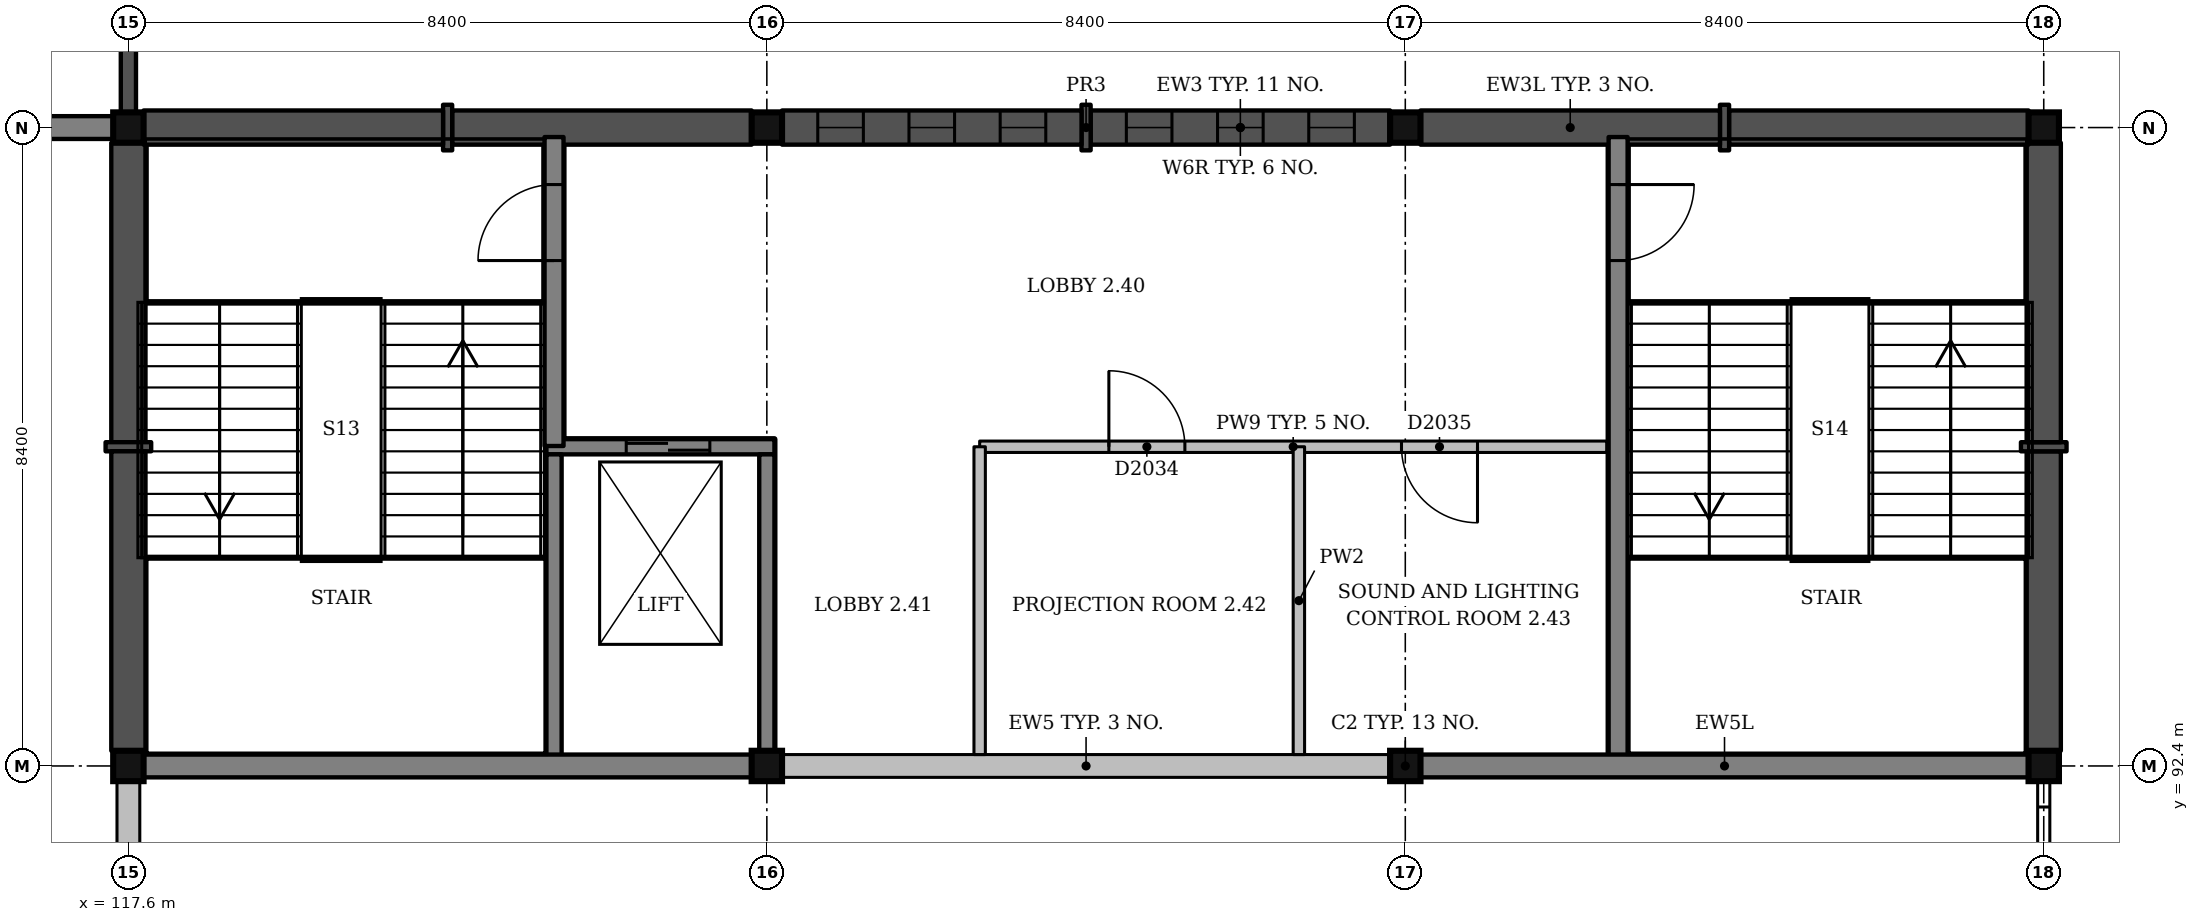
"""IFC4 building model, lengths in metres.
Left out: names, types, materials, properties, quantities, classifications, styles, units other than length and angle.
Written with IfcOpenShell. Run it as: python <this file> out.ifc"""

import sys

from ifc_helpers import new_model, si_unit, direction, frame, frame_2d, origin, origin_2d, place, context, subcontext, project, spatial, rectangle, extrude, element, fill, save


model = new_model("IFC4")
c1 = context("Model", 3, precision=1e-05, world=origin(), true_north=direction((0.0, 1.0)))
c2 = subcontext(c1, "Body", "Model", "MODEL_VIEW")
j1 = project(units=[si_unit("LENGTHUNIT", "METRE"), si_unit("PLANEANGLEUNIT", "RADIAN")], contexts=[c1])
p1 = place(None, origin())
s1 = spatial("IfcSite", under=j1, at=p1, CompositionType="ELEMENT")
p2 = place(p1, origin())
s2 = spatial("IfcBuilding", under=s1, at=p2, CompositionType="ELEMENT")
p3 = place(p2, frame((0.0, 0.0, 9.0)))
s3 = spatial("IfcBuildingStorey", under=s2, at=p3, CompositionType="ELEMENT", Elevation=9.0)
for number, where, z_axis, x_axis in (
    (1, (117.6, 92.4, 0.0), (0.0, 0.0, 1.0), (1.0, 0.0, 0.0)),
    (2, (117.6, 100.8, 0.0), (0.0, 0.0, 1.0), (1.0, 0.0, 0.0)),
    (3, (126.0, 92.4, 0.0), (0.0, 0.0, 1.0), (1.0, 0.0, 0.0)),
    (4, (126.0, 100.8, 0.0), (0.0, 0.0, 1.0), (1.0, 0.0, 0.0)),
    (5, (134.4, 92.4, 0.0), (0.0, 0.0, 1.0), (1.0, 0.0, 0.0)),
    (6, (134.4, 100.8, 0.0), (0.0, 0.0, 1.0), (1.0, 0.0, 0.0)),
    (7, (142.8, 92.4, 0.0), (0.0, 0.0, 1.0), (1.0, 0.0, 0.0)),
    (8, (142.8, 100.8, 0.0), (0.0, 0.0, 1.0), (1.0, 0.0, 0.0)),
):
    element("IfcColumn", number, at=place(p3, frame(where, z_axis=z_axis, x_axis=x_axis)), inside=s3, PredefinedType="COLUMN", context=c2, shape_type="SweptSolid", body=[
        extrude(rectangle(XDim=0.4, YDim=0.4, at=origin_2d()), origin(), (0.0, 0.0, 1.0), 4.5),
    ])
p4 = place(p3, frame((123.1, 96.6, 0.0), z_axis=(0.0, 0.0, 1.0), x_axis=(1.0, 0.0, 0.0)))
e9 = element("IfcWall", 9, at=p4, inside=s3, PredefinedType="SHEAR", context=c2, shape_type="SweptSolid", body=[
    extrude(rectangle(XDim=3.0, YDim=0.2, at=frame_2d((1.5, 0.0))), origin(), (0.0, 0.0, 1.0), 4.5),
])
p5 = place(p4, frame((1.05, 0.0, 0.0)))
e10 = element("IfcOpeningElement", 10, at=p5, cuts=e9, PredefinedType="OPENING", context=c2, shape_type="SweptSolid", body=[
    extrude(rectangle(XDim=1.1, YDim=2.1, at=frame_2d((0.55, 1.05))), frame((0.0, 0.11, 0.0), z_axis=(0.0, -1.0, 0.0), x_axis=(1.0, 0.0, 0.0)), (0.0, 0.0, 1.0), 0.22),
])
p6 = place(p3, frame((123.2, 92.5, 0.0), z_axis=(0.0, 0.0, 1.0), x_axis=(0.0, 1.0, 0.0)))
e11 = element("IfcWall", 11, at=p6, inside=s3, PredefinedType="SHEAR", context=c2, shape_type="SweptSolid", body=[
    extrude(rectangle(XDim=4.0, YDim=0.2, at=frame_2d((2.0, 0.0))), origin(), (0.0, 0.0, 1.0), 4.5),
])
p7 = place(p3, frame((126.0, 92.6, 0.0), z_axis=(0.0, 0.0, 1.0), x_axis=(0.0, 1.0, 0.0)))
e12 = element("IfcWall", 12, at=p7, inside=s3, PredefinedType="SHEAR", context=c2, shape_type="SweptSolid", body=[
    extrude(rectangle(XDim=3.9, YDim=0.2, at=frame_2d((1.95, 0.0))), origin(), (0.0, 0.0, 1.0), 4.5),
])
p8 = place(p3, frame((123.2, 96.61, 0.0), z_axis=(0.0, 0.0, 1.0), x_axis=(0.0, 1.0, 0.0)))
e13 = element("IfcWall", 13, at=p8, inside=s3, PredefinedType="SHEAR", context=c2, shape_type="SweptSolid", body=[
    extrude(rectangle(XDim=4.065, YDim=0.25, at=frame_2d((2.032, 0.0))), origin(), (0.0, 0.0, 1.0), 4.5),
])
p9 = place(p8, frame((2.44, 0.0, 0.0)))
e14 = element("IfcOpeningElement", 14, at=p9, cuts=e13, PredefinedType="OPENING", context=c2, shape_type="SweptSolid", body=[
    extrude(rectangle(XDim=1.0, YDim=2.1, at=frame_2d((0.5, 1.05))), frame((0.0, 0.135, 0.0), z_axis=(0.0, -1.0, 0.0), x_axis=(1.0, 0.0, 0.0)), (0.0, 0.0, 1.0), 0.27),
])
p10 = place(p3, frame((137.2, 92.525, 0.0), z_axis=(0.0, 0.0, 1.0), x_axis=(0.0, 1.0, 0.0)))
e15 = element("IfcWall", 15, at=p10, inside=s3, PredefinedType="SHEAR", context=c2, shape_type="SweptSolid", body=[
    extrude(rectangle(XDim=8.15, YDim=0.25, at=frame_2d((4.075, 0.0))), origin(), (0.0, 0.0, 1.0), 4.5),
])
p11 = place(p10, frame((6.525, 0.0, 0.0)))
e16 = element("IfcOpeningElement", 16, at=p11, cuts=e15, PredefinedType="OPENING", context=c2, shape_type="SweptSolid", body=[
    extrude(rectangle(XDim=1.0, YDim=2.1, at=frame_2d((0.5, 1.05))), frame((0.0, 0.135, 0.0), z_axis=(0.0, -1.0, 0.0), x_axis=(1.0, 0.0, 0.0)), (0.0, 0.0, 1.0), 0.27),
])
p12 = place(p3, frame((117.6, 100.6, 0.0), z_axis=(0.0, 0.0, 1.0), x_axis=(0.0, -1.0, 0.0)))
e17 = element("IfcWall", 17, at=p12, inside=s3, PredefinedType="SOLIDWALL", context=c2, shape_type="SweptSolid", body=[
    extrude(rectangle(XDim=3.94, YDim=0.45, at=frame_2d((1.97, 0.0))), origin(), (0.0, 0.0, 1.0), 3.65),
])
p13 = place(p3, frame((117.6, 96.66, 0.0), z_axis=(0.0, 0.0, 1.0), x_axis=(0.0, -1.0, 0.0)))
e18 = element("IfcWall", 18, at=p13, inside=s3, PredefinedType="SOLIDWALL", context=c2, shape_type="SweptSolid", body=[
    extrude(rectangle(XDim=0.12, YDim=0.6, at=frame_2d((0.06, 0.0))), origin(), (0.0, 0.0, 1.0), 3.65),
])
p14 = place(p3, frame((117.6, 96.54, 0.0), z_axis=(0.0, 0.0, 1.0), x_axis=(0.0, -1.0, 0.0)))
e19 = element("IfcWall", 19, at=p14, inside=s3, PredefinedType="SOLIDWALL", context=c2, shape_type="SweptSolid", body=[
    extrude(rectangle(XDim=3.94, YDim=0.45, at=frame_2d((1.97, 0.0))), origin(), (0.0, 0.0, 1.0), 3.65),
])
p15 = place(p3, frame((117.8, 92.4, 0.0), z_axis=(0.0, 0.0, 1.0), x_axis=(1.0, 0.0, 0.0)))
e20 = element("IfcWall", 20, at=p15, inside=s3, PredefinedType="SOLIDWALL", context=c2, shape_type="SweptSolid", body=[
    extrude(rectangle(XDim=8.0, YDim=0.3, at=frame_2d((4.0, 0.0))), origin(), (0.0, 0.0, 1.0), 3.65),
])
for number, where, z_axis, x_axis in (
    (21, (126.2, 92.4, 0.0), (0.0, 0.0, 1.0), (1.0, 0.0, 0.0)),
    (22, (134.6, 92.4, 0.0), (0.0, 0.0, 1.0), (1.0, 0.0, 0.0)),
):
    element("IfcWall", number, at=place(p3, frame(where, z_axis=z_axis, x_axis=x_axis)), inside=s3, PredefinedType="SOLIDWALL", context=c2, shape_type="SweptSolid", body=[
        extrude(rectangle(XDim=8.0, YDim=0.3, at=frame_2d((4.0, 0.0))), origin(), (0.0, 0.0, 1.0), 3.35),
    ])
p16 = place(p3, frame((142.8, 92.6, 0.0), z_axis=(0.0, 0.0, 1.0), x_axis=(0.0, 1.0, 0.0)))
e23 = element("IfcWall", 23, at=p16, inside=s3, PredefinedType="SOLIDWALL", context=c2, shape_type="SweptSolid", body=[
    extrude(rectangle(XDim=3.94, YDim=0.45, at=frame_2d((1.97, 0.0))), origin(), (0.0, 0.0, 1.0), 3.65),
])
p17 = place(p3, frame((142.8, 96.54, 0.0), z_axis=(0.0, 0.0, 1.0), x_axis=(0.0, 1.0, 0.0)))
e24 = element("IfcWall", 24, at=p17, inside=s3, PredefinedType="SOLIDWALL", context=c2, shape_type="SweptSolid", body=[
    extrude(rectangle(XDim=0.12, YDim=0.6, at=frame_2d((0.06, 0.0))), origin(), (0.0, 0.0, 1.0), 3.65),
])
p18 = place(p3, frame((142.8, 96.66, 0.0), z_axis=(0.0, 0.0, 1.0), x_axis=(0.0, 1.0, 0.0)))
e25 = element("IfcWall", 25, at=p18, inside=s3, PredefinedType="SOLIDWALL", context=c2, shape_type="SweptSolid", body=[
    extrude(rectangle(XDim=3.94, YDim=0.45, at=frame_2d((1.97, 0.0))), origin(), (0.0, 0.0, 1.0), 3.65),
])
p19 = place(p3, frame((142.6, 100.8, 0.0), z_axis=(0.0, 0.0, 1.0), x_axis=(-1.0, 0.0, 0.0)))
e26 = element("IfcWall", 26, at=p19, inside=s3, PredefinedType="SOLIDWALL", context=c2, shape_type="SweptSolid", body=[
    extrude(rectangle(XDim=3.94, YDim=0.45, at=frame_2d((1.97, 0.0))), origin(), (0.0, 0.0, 1.0), 3.35),
])
p20 = place(p3, frame((138.66, 100.8, 0.0), z_axis=(0.0, 0.0, 1.0), x_axis=(-1.0, 0.0, 0.0)))
e27 = element("IfcWall", 27, at=p20, inside=s3, PredefinedType="SOLIDWALL", context=c2, shape_type="SweptSolid", body=[
    extrude(rectangle(XDim=0.12, YDim=0.6, at=frame_2d((0.06, 0.0))), origin(), (0.0, 0.0, 1.0), 3.35),
])
p21 = place(p3, frame((138.54, 100.8, 0.0), z_axis=(0.0, 0.0, 1.0), x_axis=(-1.0, 0.0, 0.0)))
e28 = element("IfcWall", 28, at=p21, inside=s3, PredefinedType="SOLIDWALL", context=c2, shape_type="SweptSolid", body=[
    extrude(rectangle(XDim=3.94, YDim=0.45, at=frame_2d((1.97, 0.0))), origin(), (0.0, 0.0, 1.0), 3.35),
])
p22 = place(p3, frame((134.2, 100.8, 0.0), z_axis=(0.0, 0.0, 1.0), x_axis=(-1.0, 0.0, 0.0)))
e29 = element("IfcWall", 29, at=p22, inside=s3, PredefinedType="SOLIDWALL", context=c2, shape_type="SweptSolid", body=[
    extrude(rectangle(XDim=3.94, YDim=0.45, at=frame_2d((1.97, 0.0))), origin(), (0.0, 0.0, 1.0), 3.35),
])
p23 = place(p22, frame((0.47, 0.0, 1.0)))
e30 = element("IfcOpeningElement", 30, at=p23, cuts=e29, PredefinedType="OPENING", context=c2, shape_type="SweptSolid", body=[
    extrude(rectangle(XDim=0.6, YDim=1.8, at=frame_2d((0.3, 0.9))), frame((0.0, 0.235, 0.0), z_axis=(0.0, -1.0, 0.0), x_axis=(1.0, 0.0, 0.0)), (0.0, 0.0, 1.0), 0.47),
])
p24 = place(p22, frame((1.67, 0.0, 1.0)))
e31 = element("IfcOpeningElement", 31, at=p24, cuts=e29, PredefinedType="OPENING", context=c2, shape_type="SweptSolid", body=[
    extrude(rectangle(XDim=0.6, YDim=1.8, at=frame_2d((0.3, 0.9))), frame((0.0, 0.235, 0.0), z_axis=(0.0, -1.0, 0.0), x_axis=(1.0, 0.0, 0.0)), (0.0, 0.0, 1.0), 0.47),
])
p25 = place(p22, frame((2.87, 0.0, 1.0)))
e32 = element("IfcOpeningElement", 32, at=p25, cuts=e29, PredefinedType="OPENING", context=c2, shape_type="SweptSolid", body=[
    extrude(rectangle(XDim=0.6, YDim=1.8, at=frame_2d((0.3, 0.9))), frame((0.0, 0.235, 0.0), z_axis=(0.0, -1.0, 0.0), x_axis=(1.0, 0.0, 0.0)), (0.0, 0.0, 1.0), 0.47),
])
p26 = place(p3, frame((130.26, 100.8, 0.0), z_axis=(0.0, 0.0, 1.0), x_axis=(-1.0, 0.0, 0.0)))
e33 = element("IfcWall", 33, at=p26, inside=s3, PredefinedType="SOLIDWALL", context=c2, shape_type="SweptSolid", body=[
    extrude(rectangle(XDim=0.12, YDim=0.6, at=frame_2d((0.06, 0.0))), origin(), (0.0, 0.0, 1.0), 3.35),
])
p27 = place(p3, frame((130.14, 100.8, 0.0), z_axis=(0.0, 0.0, 1.0), x_axis=(-1.0, 0.0, 0.0)))
e34 = element("IfcWall", 34, at=p27, inside=s3, PredefinedType="SOLIDWALL", context=c2, shape_type="SweptSolid", body=[
    extrude(rectangle(XDim=3.94, YDim=0.45, at=frame_2d((1.97, 0.0))), origin(), (0.0, 0.0, 1.0), 3.35),
])
p28 = place(p27, frame((0.47, 0.0, 1.0)))
e35 = element("IfcOpeningElement", 35, at=p28, cuts=e34, PredefinedType="OPENING", context=c2, shape_type="SweptSolid", body=[
    extrude(rectangle(XDim=0.6, YDim=1.8, at=frame_2d((0.3, 0.9))), frame((0.0, 0.235, 0.0), z_axis=(0.0, -1.0, 0.0), x_axis=(1.0, 0.0, 0.0)), (0.0, 0.0, 1.0), 0.47),
])
p29 = place(p27, frame((1.67, 0.0, 1.0)))
e36 = element("IfcOpeningElement", 36, at=p29, cuts=e34, PredefinedType="OPENING", context=c2, shape_type="SweptSolid", body=[
    extrude(rectangle(XDim=0.6, YDim=1.8, at=frame_2d((0.3, 0.9))), frame((0.0, 0.235, 0.0), z_axis=(0.0, -1.0, 0.0), x_axis=(1.0, 0.0, 0.0)), (0.0, 0.0, 1.0), 0.47),
])
p30 = place(p27, frame((2.87, 0.0, 1.0)))
e37 = element("IfcOpeningElement", 37, at=p30, cuts=e34, PredefinedType="OPENING", context=c2, shape_type="SweptSolid", body=[
    extrude(rectangle(XDim=0.6, YDim=1.8, at=frame_2d((0.3, 0.9))), frame((0.0, 0.235, 0.0), z_axis=(0.0, -1.0, 0.0), x_axis=(1.0, 0.0, 0.0)), (0.0, 0.0, 1.0), 0.47),
])
p31 = place(p3, frame((125.8, 100.8, 0.0), z_axis=(0.0, 0.0, 1.0), x_axis=(-1.0, 0.0, 0.0)))
e38 = element("IfcWall", 38, at=p31, inside=s3, PredefinedType="SOLIDWALL", context=c2, shape_type="SweptSolid", body=[
    extrude(rectangle(XDim=3.94, YDim=0.45, at=frame_2d((1.97, 0.0))), origin(), (0.0, 0.0, 1.0), 3.35),
])
p32 = place(p3, frame((121.86, 100.8, 0.0), z_axis=(0.0, 0.0, 1.0), x_axis=(-1.0, 0.0, 0.0)))
e39 = element("IfcWall", 39, at=p32, inside=s3, PredefinedType="SOLIDWALL", context=c2, shape_type="SweptSolid", body=[
    extrude(rectangle(XDim=0.12, YDim=0.6, at=frame_2d((0.06, 0.0))), origin(), (0.0, 0.0, 1.0), 3.35),
])
p33 = place(p3, frame((121.74, 100.8, 0.0), z_axis=(0.0, 0.0, 1.0), x_axis=(-1.0, 0.0, 0.0)))
e40 = element("IfcWall", 40, at=p33, inside=s3, PredefinedType="SOLIDWALL", context=c2, shape_type="SweptSolid", body=[
    extrude(rectangle(XDim=3.94, YDim=0.45, at=frame_2d((1.97, 0.0))), origin(), (0.0, 0.0, 1.0), 3.35),
])
p34 = place(p3, frame((117.6, 101.0, 0.0), z_axis=(0.0, 0.0, 1.0), x_axis=(0.0, 1.0, 0.0)))
e41 = element("IfcWall", 41, at=p34, inside=s3, PredefinedType="SOLIDWALL", context=c2, shape_type="SweptSolid", body=[
    extrude(rectangle(XDim=8.0, YDim=0.2, at=frame_2d((4.0, 0.0))), origin(), (0.0, 0.0, 1.0), 4.5),
])
p35 = place(p3, frame((109.4, 100.8, 0.0), z_axis=(0.0, 0.0, 1.0), x_axis=(1.0, 0.0, 0.0)))
e42 = element("IfcWall", 42, at=p35, inside=s3, PredefinedType="SOLIDWALL", context=c2, shape_type="SweptSolid", body=[
    extrude(rectangle(XDim=8.0, YDim=0.3, at=frame_2d((4.0, 0.0))), origin(), (0.0, 0.0, 1.0), 4.5),
])
p36 = place(p3, frame((117.6, 92.2, 0.0), z_axis=(0.0, 0.0, 1.0), x_axis=(0.0, -1.0, 0.0)))
e43 = element("IfcWall", 43, at=p36, inside=s3, PredefinedType="SOLIDWALL", context=c2, shape_type="SweptSolid", body=[
    extrude(rectangle(XDim=8.0, YDim=0.3, at=frame_2d((4.0, 0.0))), origin(), (0.0, 0.0, 1.0), 3.65),
])
p37 = place(p3, frame((128.8, 96.6, 0.0), z_axis=(0.0, 0.0, 1.0), x_axis=(1.0, 0.0, 0.0)))
e44 = element("IfcWall", 44, at=p37, inside=s3, PredefinedType="PARTITIONING", context=c2, shape_type="SweptSolid", body=[
    extrude(rectangle(XDim=8.25, YDim=0.15, at=frame_2d((4.125, 0.0))), origin(), (0.0, 0.0, 1.0), 3.4),
])
p38 = place(p37, frame((1.7, 0.0, 0.0)))
e45 = element("IfcOpeningElement", 45, at=p38, cuts=e44, PredefinedType="OPENING", context=c2, shape_type="SweptSolid", body=[
    extrude(rectangle(XDim=1.0, YDim=2.1, at=frame_2d((0.5, 1.05))), frame((0.0, 0.085, 0.0), z_axis=(0.0, -1.0, 0.0), x_axis=(1.0, 0.0, 0.0)), (0.0, 0.0, 1.0), 0.17),
])
p39 = place(p37, frame((5.55, 0.0, 0.0)))
e46 = element("IfcOpeningElement", 46, at=p39, cuts=e44, PredefinedType="OPENING", context=c2, shape_type="SweptSolid", body=[
    extrude(rectangle(XDim=1.0, YDim=2.1, at=frame_2d((0.5, 1.05))), frame((0.0, 0.085, 0.0), z_axis=(0.0, -1.0, 0.0), x_axis=(1.0, 0.0, 0.0)), (0.0, 0.0, 1.0), 0.17),
])
for number, where, z_axis, x_axis in (
    (47, (128.8, 92.55, 0.0), (0.0, 0.0, 1.0), (0.0, 1.0, 0.0)),
    (48, (133.0, 92.55, 0.0), (0.0, 0.0, 1.0), (0.0, 1.0, 0.0)),
):
    element("IfcWall", number, at=place(p3, frame(where, z_axis=z_axis, x_axis=x_axis)), inside=s3, PredefinedType="PARTITIONING", context=c2, shape_type="SweptSolid", body=[
        extrude(rectangle(XDim=4.05, YDim=0.15, at=frame_2d((2.025, 0.0))), origin(), (0.0, 0.0, 1.0), 3.35),
    ])
p40 = place(p23, origin())
e49 = element("IfcWindow", 49, at=p40, inside=s3, PartitioningType="SINGLE_PANEL", PredefinedType="WINDOW", context=c2, shape_type="SweptSolid", body=[
    extrude(rectangle(XDim=0.6, YDim=1.8, at=frame_2d((0.3, 0.9))), frame((0.0, 0.135, 0.0), z_axis=(0.0, -1.0, 0.0), x_axis=(1.0, 0.0, 0.0)), (0.0, 0.0, 1.0), 0.06),
])
fill(e30, e49)
p41 = place(p24, origin())
e50 = element("IfcWindow", 50, at=p41, inside=s3, PartitioningType="SINGLE_PANEL", PredefinedType="WINDOW", context=c2, shape_type="SweptSolid", body=[
    extrude(rectangle(XDim=0.6, YDim=1.8, at=frame_2d((0.3, 0.9))), frame((0.0, 0.135, 0.0), z_axis=(0.0, -1.0, 0.0), x_axis=(1.0, 0.0, 0.0)), (0.0, 0.0, 1.0), 0.06),
])
fill(e31, e50)
p42 = place(p25, origin())
e51 = element("IfcWindow", 51, at=p42, inside=s3, PartitioningType="SINGLE_PANEL", PredefinedType="WINDOW", context=c2, shape_type="SweptSolid", body=[
    extrude(rectangle(XDim=0.6, YDim=1.8, at=frame_2d((0.3, 0.9))), frame((0.0, 0.135, 0.0), z_axis=(0.0, -1.0, 0.0), x_axis=(1.0, 0.0, 0.0)), (0.0, 0.0, 1.0), 0.06),
])
fill(e32, e51)
p43 = place(p28, origin())
e52 = element("IfcWindow", 52, at=p43, inside=s3, PartitioningType="SINGLE_PANEL", PredefinedType="WINDOW", context=c2, shape_type="SweptSolid", body=[
    extrude(rectangle(XDim=0.6, YDim=1.8, at=frame_2d((0.3, 0.9))), frame((0.0, 0.135, 0.0), z_axis=(0.0, -1.0, 0.0), x_axis=(1.0, 0.0, 0.0)), (0.0, 0.0, 1.0), 0.06),
])
fill(e35, e52)
p44 = place(p29, origin())
e53 = element("IfcWindow", 53, at=p44, inside=s3, PartitioningType="SINGLE_PANEL", PredefinedType="WINDOW", context=c2, shape_type="SweptSolid", body=[
    extrude(rectangle(XDim=0.6, YDim=1.8, at=frame_2d((0.3, 0.9))), frame((0.0, 0.135, 0.0), z_axis=(0.0, -1.0, 0.0), x_axis=(1.0, 0.0, 0.0)), (0.0, 0.0, 1.0), 0.06),
])
fill(e36, e53)
p45 = place(p30, origin())
e54 = element("IfcWindow", 54, at=p45, inside=s3, PartitioningType="SINGLE_PANEL", PredefinedType="WINDOW", context=c2, shape_type="SweptSolid", body=[
    extrude(rectangle(XDim=0.6, YDim=1.8, at=frame_2d((0.3, 0.9))), frame((0.0, 0.135, 0.0), z_axis=(0.0, -1.0, 0.0), x_axis=(1.0, 0.0, 0.0)), (0.0, 0.0, 1.0), 0.06),
])
fill(e37, e54)
p46 = place(p38, origin())
e55 = element("IfcDoor", 55, at=p46, inside=s3, OperationType="SINGLE_SWING_LEFT", PredefinedType="DOOR", context=c2, shape_type="SweptSolid", body=[
    extrude(rectangle(XDim=1.0, YDim=2.1, at=frame_2d((0.5, 1.05))), frame((0.0, 0.025, 0.0), z_axis=(0.0, -1.0, 0.0), x_axis=(1.0, 0.0, 0.0)), (0.0, 0.0, 1.0), 0.05),
])
fill(e45, e55)
p47 = place(p39, origin())
e56 = element("IfcDoor", 56, at=p47, inside=s3, OperationType="SINGLE_SWING_RIGHT", PredefinedType="DOOR", context=c2, shape_type="SweptSolid", body=[
    extrude(rectangle(XDim=1.0, YDim=2.1, at=frame_2d((0.5, 1.05))), frame((0.0, 0.025, 0.0), z_axis=(0.0, -1.0, 0.0), x_axis=(1.0, 0.0, 0.0)), (0.0, 0.0, 1.0), 0.05),
])
fill(e46, e56)
p48 = place(p9, origin())
e57 = element("IfcDoor", 57, at=p48, inside=s3, OperationType="SINGLE_SWING_LEFT", PredefinedType="DOOR", context=c2, shape_type="SweptSolid", body=[
    extrude(rectangle(XDim=1.0, YDim=2.1, at=frame_2d((0.5, 1.05))), frame((0.0, 0.025, 0.0), z_axis=(0.0, -1.0, 0.0), x_axis=(1.0, 0.0, 0.0)), (0.0, 0.0, 1.0), 0.05),
])
fill(e14, e57)
p49 = place(p11, origin())
e58 = element("IfcDoor", 58, at=p49, inside=s3, OperationType="SINGLE_SWING_RIGHT", PredefinedType="DOOR", context=c2, shape_type="SweptSolid", body=[
    extrude(rectangle(XDim=1.0, YDim=2.1, at=frame_2d((0.5, 1.05))), frame((0.0, 0.025, 0.0), z_axis=(0.0, -1.0, 0.0), x_axis=(1.0, 0.0, 0.0)), (0.0, 0.0, 1.0), 0.05),
])
fill(e16, e58)
p50 = place(p5, origin())
e59 = element("IfcDoor", 59, at=p50, inside=s3, OperationType="SLIDING_TO_LEFT", PredefinedType="DOOR", context=c2, shape_type="SweptSolid", body=[
    extrude(rectangle(XDim=1.1, YDim=2.1, at=frame_2d((0.55, 1.05))), frame((0.0, 0.025, 0.0), z_axis=(0.0, -1.0, 0.0), x_axis=(1.0, 0.0, 0.0)), (0.0, 0.0, 1.0), 0.05),
])
fill(e10, e59)
save(model, sys.argv[1])
